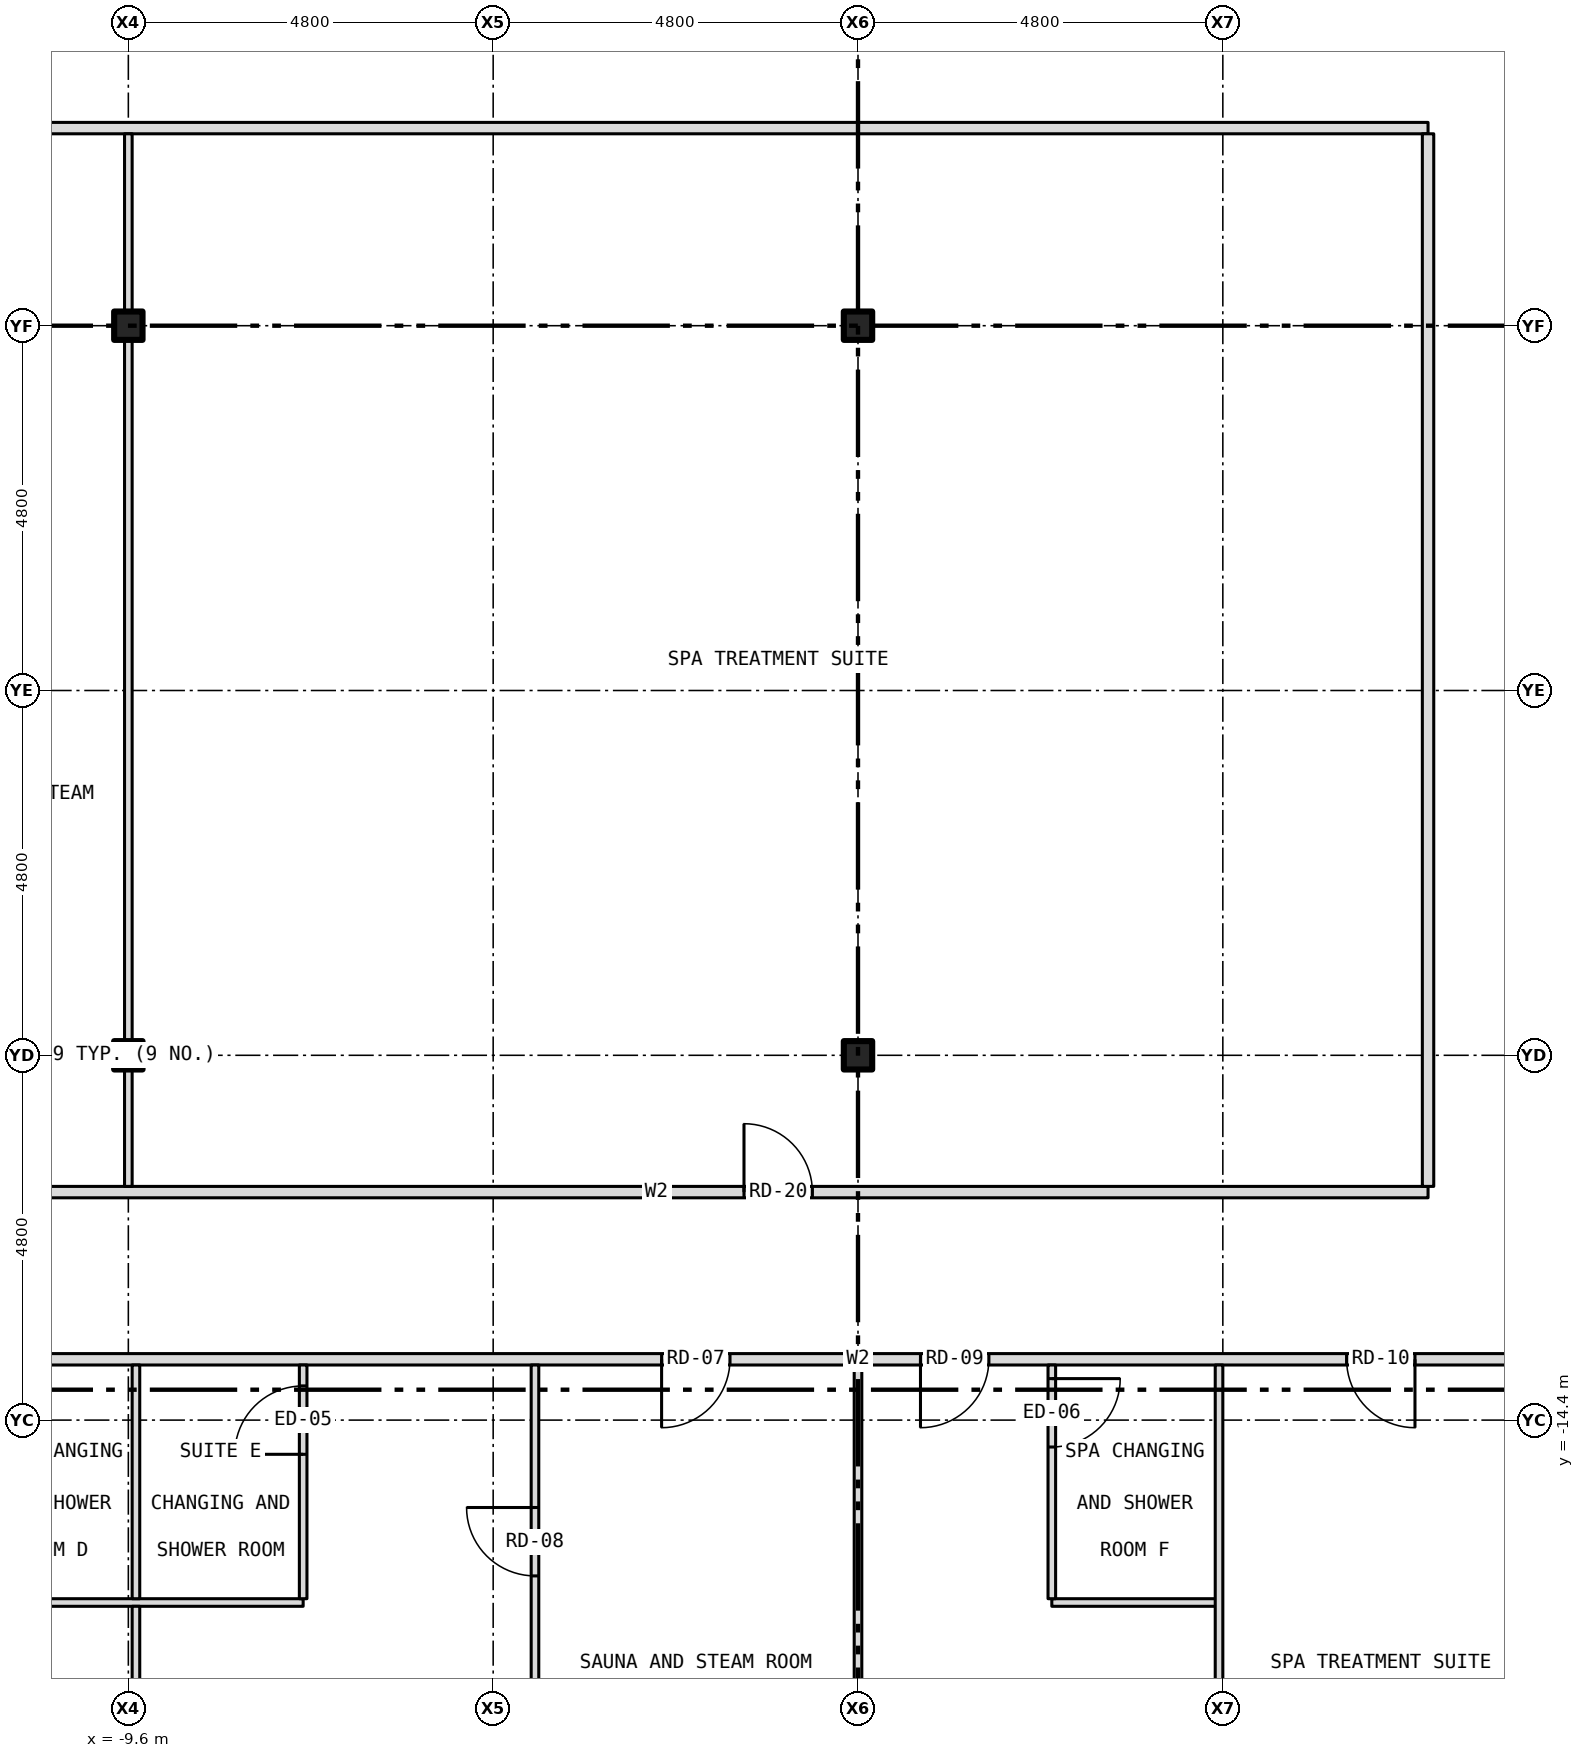
"""IFC4 building model, lengths in metres.
Left out: names, types, materials, properties, quantities, classifications, styles, units other than length and angle.
Written with IfcOpenShell. Run it as: python <this file> out.ifc"""

import sys

from ifc_helpers import new_model, si_unit, direction, frame, frame_2d, origin, origin_2d, place, context, subcontext, project, spatial, rectangle, i_section, extrude, element, fill, save


model = new_model("IFC4")
c1 = context("Model", 3, precision=1e-05, world=origin(), true_north=direction((0.0, 1.0)))
c2 = subcontext(c1, "Body", "Model", "MODEL_VIEW")
j1 = project(units=[si_unit("LENGTHUNIT", "METRE"), si_unit("PLANEANGLEUNIT", "RADIAN")], contexts=[c1])
p1 = place(None, origin())
s1 = spatial("IfcSite", under=j1, at=p1, CompositionType="ELEMENT")
p2 = place(p1, origin())
s2 = spatial("IfcBuilding", under=s1, at=p2, CompositionType="ELEMENT")
p3 = place(p2, frame((0.0, 0.0, 142.5)))
s3 = spatial("IfcBuildingStorey", under=s2, at=p3, CompositionType="ELEMENT", Elevation=142.5)
for number, where, z_axis, x_axis in (
    (1, (-9.6, -9.6, -0.2), (0.0, 0.0, 1.0), (1.0, 0.0, 0.0)),
    (2, (-9.6, 0.0, -0.2), (0.0, 0.0, 1.0), (1.0, 0.0, 0.0)),
    (3, (0.0, -9.6, -0.2), (0.0, 0.0, 1.0), (1.0, 0.0, 0.0)),
    (4, (0.0, 0.0, -0.2), (0.0, 0.0, 1.0), (1.0, 0.0, 0.0)),
):
    element("IfcColumn", number, at=place(p3, frame(where, z_axis=z_axis, x_axis=x_axis)), inside=s3, PredefinedType="COLUMN", context=c2, shape_type="SweptSolid", body=[
        extrude(i_section(OverallWidth=0.373, OverallDepth=0.373, WebThickness=0.016, FlangeThickness=0.026, at=origin_2d()), origin(), (0.0, 0.0, 1.0), 5.55),
    ])
p4 = place(p3, frame((-11.7, -16.8, 0.0), z_axis=(0.0, 0.0, 1.0), x_axis=(1.0, 0.0, 0.0)))
e5 = element("IfcWall", 5, at=p4, inside=s3, PredefinedType="PARTITIONING", context=c2, shape_type="SweptSolid", body=[
    extrude(rectangle(XDim=4.4, YDim=0.1, at=frame_2d((2.2, 0.0))), origin(), (0.0, 0.0, 1.0), 5.35),
])
p5 = place(p3, frame((2.55, -16.8, 0.0), z_axis=(0.0, 0.0, 1.0), x_axis=(1.0, 0.0, 0.0)))
e6 = element("IfcWall", 6, at=p5, inside=s3, PredefinedType="PARTITIONING", context=c2, shape_type="SweptSolid", body=[
    extrude(rectangle(XDim=2.2, YDim=0.1, at=frame_2d((1.1, 0.0))), origin(), (0.0, 0.0, 1.0), 5.35),
])
p6 = place(p3, frame((-15.8, -13.6, 0.0), z_axis=(0.0, 0.0, 1.0), x_axis=(1.0, 0.0, 0.0)))
e7 = element("IfcWall", 7, at=p6, inside=s3, PredefinedType="PARTITIONING", context=c2, shape_type="SweptSolid", body=[
    extrude(rectangle(XDim=31.6, YDim=0.15, at=frame_2d((15.8, 0.0))), origin(), (0.0, 0.0, 1.0), 5.35),
])
p7 = place(p6, frame((2.393, 0.0, 0.0)))
e8 = element("IfcOpeningElement", 8, at=p7, cuts=e7, PredefinedType="OPENING", context=c2, shape_type="SweptSolid", body=[
    extrude(rectangle(XDim=0.9, YDim=2.1, at=frame_2d((0.45, 1.05))), frame((0.0, 0.087, 0.0), z_axis=(0.0, -1.0, 0.0), x_axis=(1.0, 0.0, 0.0)), (0.0, 0.0, 1.0), 0.174),
])
p8 = place(p6, frame((13.216, 0.0, 0.0)))
e9 = element("IfcOpeningElement", 9, at=p8, cuts=e7, PredefinedType="OPENING", context=c2, shape_type="SweptSolid", body=[
    extrude(rectangle(XDim=0.9, YDim=2.1, at=frame_2d((0.45, 1.05))), frame((0.0, 0.087, 0.0), z_axis=(0.0, -1.0, 0.0), x_axis=(1.0, 0.0, 0.0)), (0.0, 0.0, 1.0), 0.174),
])
p9 = place(p6, frame((16.622, 0.0, 0.0)))
e10 = element("IfcOpeningElement", 10, at=p9, cuts=e7, PredefinedType="OPENING", context=c2, shape_type="SweptSolid", body=[
    extrude(rectangle(XDim=0.9, YDim=2.1, at=frame_2d((0.45, 1.05))), frame((0.0, 0.087, 0.0), z_axis=(0.0, -1.0, 0.0), x_axis=(1.0, 0.0, 0.0)), (0.0, 0.0, 1.0), 0.174),
])
p10 = place(p6, frame((22.228, 0.0, 0.0)))
e11 = element("IfcOpeningElement", 11, at=p10, cuts=e7, PredefinedType="OPENING", context=c2, shape_type="SweptSolid", body=[
    extrude(rectangle(XDim=0.9, YDim=2.1, at=frame_2d((0.45, 1.05))), frame((0.0, 0.087, 0.0), z_axis=(0.0, -1.0, 0.0), x_axis=(1.0, 0.0, 0.0)), (0.0, 0.0, 1.0), 0.174),
])
p11 = place(p3, frame((-12.8, -11.4, 0.0), z_axis=(0.0, 0.0, 1.0), x_axis=(1.0, 0.0, 0.0)))
e12 = element("IfcWall", 12, at=p11, inside=s3, PredefinedType="PARTITIONING", context=c2, shape_type="SweptSolid", body=[
    extrude(rectangle(XDim=20.3, YDim=0.15, at=frame_2d((10.15, 0.0))), origin(), (0.0, 0.0, 1.0), 5.35),
])
p12 = place(p11, frame((11.3, 0.0, 0.0)))
e13 = element("IfcOpeningElement", 13, at=p12, cuts=e12, PredefinedType="OPENING", context=c2, shape_type="SweptSolid", body=[
    extrude(rectangle(XDim=0.9, YDim=2.1, at=frame_2d((0.45, 1.05))), frame((0.0, 0.087, 0.0), z_axis=(0.0, -1.0, 0.0), x_axis=(1.0, 0.0, 0.0)), (0.0, 0.0, 1.0), 0.174),
])
p13 = place(p3, frame((-12.8, 2.6, 0.0), z_axis=(0.0, 0.0, 1.0), x_axis=(1.0, 0.0, 0.0)))
e14 = element("IfcWall", 14, at=p13, inside=s3, PredefinedType="PARTITIONING", context=c2, shape_type="SweptSolid", body=[
    extrude(rectangle(XDim=20.3, YDim=0.15, at=frame_2d((10.15, 0.0))), origin(), (0.0, 0.0, 1.0), 5.35),
])
p14 = place(p3, frame((-9.6, -11.325, 0.0), z_axis=(0.0, 0.0, 1.0), x_axis=(0.0, 1.0, 0.0)))
e15 = element("IfcWall", 15, at=p14, inside=s3, PredefinedType="PARTITIONING", context=c2, shape_type="SweptSolid", body=[
    extrude(rectangle(XDim=1.538, YDim=0.1, at=frame_2d((0.769, 0.0))), origin(), (0.0, 0.0, 1.0), 4.728),
])
p15 = place(p3, frame((-9.6, -9.787, 0.0), z_axis=(0.0, 0.0, 1.0), x_axis=(0.0, 1.0, 0.0)))
e16 = element("IfcWall", 16, at=p15, inside=s3, PredefinedType="PARTITIONING", context=c2, shape_type="SweptSolid", body=[
    extrude(rectangle(XDim=0.374, YDim=0.1, at=frame_2d((0.187, 0.0))), origin(), (0.0, 0.0, 1.0), 5.35),
])
p16 = place(p3, frame((-9.6, -9.413, 0.0), z_axis=(0.0, 0.0, 1.0), x_axis=(0.0, 1.0, 0.0)))
e17 = element("IfcWall", 17, at=p16, inside=s3, PredefinedType="PARTITIONING", context=c2, shape_type="SweptSolid", body=[
    extrude(rectangle(XDim=9.226, YDim=0.1, at=frame_2d((4.613, 0.0))), origin(), (0.0, 0.0, 1.0), 4.728),
])
p17 = place(p3, frame((-9.6, -0.187, 0.0), z_axis=(0.0, 0.0, 1.0), x_axis=(0.0, 1.0, 0.0)))
e18 = element("IfcWall", 18, at=p17, inside=s3, PredefinedType="PARTITIONING", context=c2, shape_type="SweptSolid", body=[
    extrude(rectangle(XDim=0.374, YDim=0.1, at=frame_2d((0.187, 0.0))), origin(), (0.0, 0.0, 1.0), 5.35),
])
p18 = place(p3, frame((-9.6, 0.187, 0.0), z_axis=(0.0, 0.0, 1.0), x_axis=(0.0, 1.0, 0.0)))
e19 = element("IfcWall", 19, at=p18, inside=s3, PredefinedType="PARTITIONING", context=c2, shape_type="SweptSolid", body=[
    extrude(rectangle(XDim=2.338, YDim=0.1, at=frame_2d((1.169, 0.0))), origin(), (0.0, 0.0, 1.0), 4.728),
])
p19 = place(p3, frame((-9.5, -22.03, 0.0), z_axis=(0.0, 0.0, 1.0), x_axis=(0.0, 1.0, 0.0)))
e20 = element("IfcWall", 20, at=p19, inside=s3, PredefinedType="PARTITIONING", context=c2, shape_type="SweptSolid", body=[
    extrude(rectangle(XDim=5.18, YDim=0.1, at=frame_2d((2.59, 0.0))), origin(), (0.0, 0.0, 1.0), 4.728),
])
p20 = place(p3, frame((-9.5, -16.75, 0.0), z_axis=(0.0, 0.0, 1.0), x_axis=(0.0, 1.0, 0.0)))
e21 = element("IfcWall", 21, at=p20, inside=s3, PredefinedType="PARTITIONING", context=c2, shape_type="SweptSolid", body=[
    extrude(rectangle(XDim=3.075, YDim=0.1, at=frame_2d((1.538, 0.0))), origin(), (0.0, 0.0, 1.0), 4.728),
])
p21 = place(p3, frame((-7.3, -16.75, 0.0), z_axis=(0.0, 0.0, 1.0), x_axis=(0.0, 1.0, 0.0)))
e22 = element("IfcWall", 22, at=p21, inside=s3, PredefinedType="PARTITIONING", context=c2, shape_type="SweptSolid", body=[
    extrude(rectangle(XDim=3.075, YDim=0.1, at=frame_2d((1.538, 0.0))), origin(), (0.0, 0.0, 1.0), 5.35),
])
p22 = place(p21, frame((1.9, 0.0, 0.0)))
e23 = element("IfcOpeningElement", 23, at=p22, cuts=e22, PredefinedType="OPENING", context=c2, shape_type="SweptSolid", body=[
    extrude(rectangle(XDim=0.9, YDim=2.1, at=frame_2d((0.45, 1.05))), frame((0.0, 0.062, 0.0), z_axis=(0.0, -1.0, 0.0), x_axis=(1.0, 0.0, 0.0)), (0.0, 0.0, 1.0), 0.124),
])
p23 = place(p3, frame((-4.25, -22.03, 0.0), z_axis=(0.0, 0.0, 1.0), x_axis=(0.0, 1.0, 0.0)))
e24 = element("IfcWall", 24, at=p23, inside=s3, PredefinedType="PARTITIONING", context=c2, shape_type="SweptSolid", body=[
    extrude(rectangle(XDim=8.355, YDim=0.1, at=frame_2d((4.177, 0.0))), origin(), (0.0, 0.0, 1.0), 5.35),
])
p24 = place(p23, frame((5.58, 0.0, 0.0)))
e25 = element("IfcOpeningElement", 25, at=p24, cuts=e24, PredefinedType="OPENING", context=c2, shape_type="SweptSolid", body=[
    extrude(rectangle(XDim=0.9, YDim=2.1, at=frame_2d((0.45, 1.05))), frame((0.0, 0.062, 0.0), z_axis=(0.0, -1.0, 0.0), x_axis=(1.0, 0.0, 0.0)), (0.0, 0.0, 1.0), 0.124),
])
p25 = place(p3, frame((0.0, -22.03, 0.0), z_axis=(0.0, 0.0, 1.0), x_axis=(0.0, 1.0, 0.0)))
e26 = element("IfcWall", 26, at=p25, inside=s3, PredefinedType="PARTITIONING", context=c2, shape_type="SweptSolid", body=[
    extrude(rectangle(XDim=8.355, YDim=0.1, at=frame_2d((4.177, 0.0))), origin(), (0.0, 0.0, 1.0), 4.728),
])
p26 = place(p3, frame((2.55, -16.75, 0.0), z_axis=(0.0, 0.0, 1.0), x_axis=(0.0, 1.0, 0.0)))
e27 = element("IfcWall", 27, at=p26, inside=s3, PredefinedType="PARTITIONING", context=c2, shape_type="SweptSolid", body=[
    extrude(rectangle(XDim=3.075, YDim=0.1, at=frame_2d((1.538, 0.0))), origin(), (0.0, 0.0, 1.0), 5.35),
])
p27 = place(p26, frame((1.996, 0.0, 0.0)))
e28 = element("IfcOpeningElement", 28, at=p27, cuts=e27, PredefinedType="OPENING", context=c2, shape_type="SweptSolid", body=[
    extrude(rectangle(XDim=0.9, YDim=2.1, at=frame_2d((0.45, 1.05))), frame((0.0, 0.062, 0.0), z_axis=(0.0, -1.0, 0.0), x_axis=(1.0, 0.0, 0.0)), (0.0, 0.0, 1.0), 0.124),
])
p28 = place(p3, frame((4.75, -22.03, 0.0), z_axis=(0.0, 0.0, 1.0), x_axis=(0.0, 1.0, 0.0)))
e29 = element("IfcWall", 29, at=p28, inside=s3, PredefinedType="PARTITIONING", context=c2, shape_type="SweptSolid", body=[
    extrude(rectangle(XDim=8.355, YDim=0.1, at=frame_2d((4.177, 0.0))), origin(), (0.0, 0.0, 1.0), 4.817),
])
p29 = place(p3, frame((7.5, -11.325, 0.0), z_axis=(0.0, 0.0, 1.0), x_axis=(0.0, 1.0, 0.0)))
e30 = element("IfcWall", 30, at=p29, inside=s3, PredefinedType="PARTITIONING", context=c2, shape_type="SweptSolid", body=[
    extrude(rectangle(XDim=13.85, YDim=0.15, at=frame_2d((6.925, 0.0))), origin(), (0.0, 0.0, 1.0), 5.35),
])
p30 = place(p8, origin())
e31 = element("IfcDoor", 31, at=p30, inside=s3, OperationType="SINGLE_SWING_LEFT", PredefinedType="DOOR", context=c2, shape_type="SweptSolid", body=[
    extrude(rectangle(XDim=0.9, YDim=2.1, at=frame_2d((0.45, 1.05))), frame((0.0, 0.025, 0.0), z_axis=(0.0, -1.0, 0.0), x_axis=(1.0, 0.0, 0.0)), (0.0, 0.0, 1.0), 0.05),
])
fill(e9, e31)
p31 = place(p24, origin())
e32 = element("IfcDoor", 32, at=p31, inside=s3, OperationType="SINGLE_SWING_RIGHT", PredefinedType="DOOR", context=c2, shape_type="SweptSolid", body=[
    extrude(rectangle(XDim=0.9, YDim=2.1, at=frame_2d((0.45, 1.05))), frame((0.0, 0.025, 0.0), z_axis=(0.0, -1.0, 0.0), x_axis=(1.0, 0.0, 0.0)), (0.0, 0.0, 1.0), 0.05),
])
fill(e25, e32)
p32 = place(p22, origin())
e33 = element("IfcDoor", 33, at=p32, inside=s3, OperationType="SINGLE_SWING_LEFT", PredefinedType="DOOR", context=c2, shape_type="SweptSolid", body=[
    extrude(rectangle(XDim=0.9, YDim=2.1, at=frame_2d((0.45, 1.05))), frame((0.0, 0.025, 0.0), z_axis=(0.0, -1.0, 0.0), x_axis=(1.0, 0.0, 0.0)), (0.0, 0.0, 1.0), 0.05),
])
fill(e23, e33)
p33 = place(p9, origin())
e34 = element("IfcDoor", 34, at=p33, inside=s3, OperationType="SINGLE_SWING_LEFT", PredefinedType="DOOR", context=c2, shape_type="SweptSolid", body=[
    extrude(rectangle(XDim=0.9, YDim=2.1, at=frame_2d((0.45, 1.05))), frame((0.0, 0.025, 0.0), z_axis=(0.0, -1.0, 0.0), x_axis=(1.0, 0.0, 0.0)), (0.0, 0.0, 1.0), 0.05),
])
fill(e10, e34)
p34 = place(p27, origin())
e35 = element("IfcDoor", 35, at=p34, inside=s3, OperationType="SINGLE_SWING_RIGHT", PredefinedType="DOOR", context=c2, shape_type="SweptSolid", body=[
    extrude(rectangle(XDim=0.9, YDim=2.1, at=frame_2d((0.45, 1.05))), frame((0.0, 0.025, 0.0), z_axis=(0.0, -1.0, 0.0), x_axis=(1.0, 0.0, 0.0)), (0.0, 0.0, 1.0), 0.05),
])
fill(e28, e35)
p35 = place(p10, origin())
e36 = element("IfcDoor", 36, at=p35, inside=s3, OperationType="SINGLE_SWING_RIGHT", PredefinedType="DOOR", context=c2, shape_type="SweptSolid", body=[
    extrude(rectangle(XDim=0.9, YDim=2.1, at=frame_2d((0.45, 1.05))), frame((0.0, 0.025, 0.0), z_axis=(0.0, -1.0, 0.0), x_axis=(1.0, 0.0, 0.0)), (0.0, 0.0, 1.0), 0.05),
])
fill(e11, e36)
p36 = place(p12, origin())
e37 = element("IfcDoor", 37, at=p36, inside=s3, OperationType="SINGLE_SWING_LEFT", PredefinedType="DOOR", context=c2, shape_type="SweptSolid", body=[
    extrude(rectangle(XDim=0.9, YDim=2.1, at=frame_2d((0.45, 1.05))), frame((0.0, 0.025, 0.0), z_axis=(0.0, -1.0, 0.0), x_axis=(1.0, 0.0, 0.0)), (0.0, 0.0, 1.0), 0.05),
])
fill(e13, e37)
save(model, sys.argv[1])
